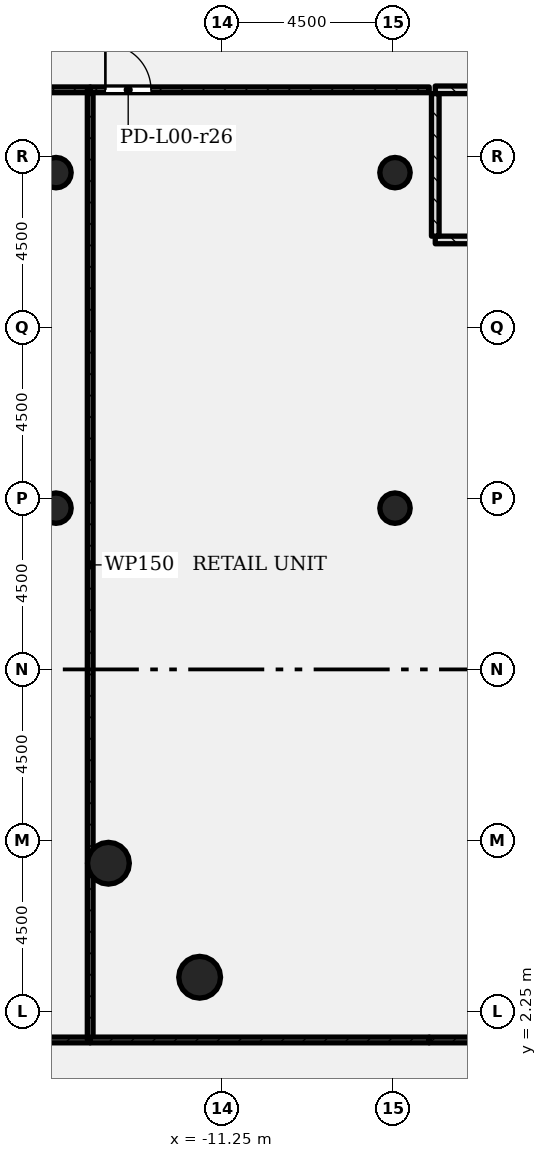
"""IFC4 building model, lengths in metres.
Left out: names, types, materials, properties, quantities, classifications, styles, units other than length and angle.
Written with IfcOpenShell. Run it as: python <this file> out.ifc"""

import sys

from ifc_helpers import new_model, si_unit, direction, frame, frame_2d, origin, origin_2d, place, context, subcontext, project, spatial, rectangle, hollow_circle, extrude, element, fill, save


model = new_model("IFC4")
c1 = context("Model", 3, precision=1e-05, world=origin(), true_north=direction((0.0, 1.0)))
c2 = subcontext(c1, "Body", "Model", "MODEL_VIEW")
j1 = project(units=[si_unit("LENGTHUNIT", "METRE"), si_unit("PLANEANGLEUNIT", "RADIAN")], contexts=[c1])
p1 = place(None, origin())
s1 = spatial("IfcSite", under=j1, at=p1, CompositionType="ELEMENT")
p2 = place(p1, origin())
s2 = spatial("IfcBuilding", under=s1, at=p2, CompositionType="ELEMENT")
p3 = place(p2, origin())
s3 = spatial("IfcBuildingStorey", under=s2, at=p3, CompositionType="ELEMENT", Elevation=0.0)
for number, where, z_axis, x_axis in (
    (1, (-14.25, 6.15, -0.4), (0.0, 0.0, 1.0), (1.0, 0.0, 0.0)),
    (2, (-11.85, 3.15, -0.4), (0.0, 0.0, 1.0), (1.0, 0.0, 0.0)),
):
    element("IfcColumn", number, at=place(p3, frame(where, z_axis=z_axis, x_axis=x_axis)), inside=s3, PredefinedType="COLUMN", context=c2, shape_type="SweptSolid", body=[
        extrude(hollow_circle(Radius=0.55, WallThickness=0.04, at=origin_2d()), origin(), (0.0, 0.0, 1.0), 6.4),
    ])
for number, where, z_axis, x_axis in (
    (3, (-15.63, 15.493, -0.4), (0.0, 0.0, 1.0), (1.0, 0.0, 0.0)),
    (4, (-6.71, 15.493, -0.4), (0.0, 0.0, 1.0), (1.0, 0.0, 0.0)),
    (5, (-15.63, 24.321, -0.4), (0.0, 0.0, 1.0), (1.0, 0.0, 0.0)),
    (6, (-6.71, 24.321, -0.4), (0.0, 0.0, 1.0), (1.0, 0.0, 0.0)),
):
    element("IfcColumn", number, at=place(p3, frame(where, z_axis=z_axis, x_axis=x_axis)), inside=s3, PredefinedType="COLUMN", context=c2, shape_type="SweptSolid", body=[
        extrude(hollow_circle(Radius=0.4, WallThickness=0.028, at=origin_2d()), origin(), (0.0, 0.0, 1.0), 6.4),
    ])
p4 = place(p3, frame((-23.65, 26.5, 0.0), z_axis=(0.0, 0.0, 1.0), x_axis=(1.0, 0.0, 0.0)))
e7 = element("IfcWall", 7, at=p4, inside=s3, PredefinedType="PARTITIONING", context=c2, shape_type="SweptSolid", body=[
    extrude(rectangle(XDim=8.92, YDim=0.15, at=frame_2d((4.46, 0.0))), origin(), (0.0, 0.0, 1.0), 5.58),
])
p5 = place(p4, frame((0.4, 0.0, 0.0)))
e8 = element("IfcOpeningElement", 8, at=p5, cuts=e7, PredefinedType="OPENING", context=c2, shape_type="SweptSolid", body=[
    extrude(rectangle(XDim=1.2, YDim=2.1, at=frame_2d((0.6, 1.05))), frame((0.0, 0.085, 0.0), z_axis=(0.0, -1.0, 0.0), x_axis=(1.0, 0.0, 0.0)), (0.0, 0.0, 1.0), 0.17),
])
p6 = place(p3, frame((-14.73, 1.5, 0.0), z_axis=(0.0, 0.0, 1.0), x_axis=(-1.0, 0.0, 0.0)))
e9 = element("IfcWall", 9, at=p6, inside=s3, PredefinedType="PARTITIONING", context=c2, shape_type="SweptSolid", body=[
    extrude(rectangle(XDim=5.52, YDim=0.15, at=frame_2d((2.76, 0.0))), origin(), (0.0, 0.0, 1.0), 5.58),
])
p7 = place(p3, frame((-14.73, 26.5, 0.0), z_axis=(0.0, 0.0, 1.0), x_axis=(0.0, -1.0, 0.0)))
e10 = element("IfcWall", 10, at=p7, inside=s3, PredefinedType="PARTITIONING", context=c2, shape_type="SweptSolid", body=[
    extrude(rectangle(XDim=25.0, YDim=0.15, at=frame_2d((12.5, 0.0))), origin(), (0.0, 0.0, 1.0), 5.58),
])
p8 = place(p3, frame((-14.73, 26.5, 0.0), z_axis=(0.0, 0.0, 1.0), x_axis=(1.0, 0.0, 0.0)))
e11 = element("IfcWall", 11, at=p8, inside=s3, PredefinedType="PARTITIONING", context=c2, shape_type="SweptSolid", body=[
    extrude(rectangle(XDim=8.92, YDim=0.15, at=frame_2d((4.46, 0.0))), origin(), (0.0, 0.0, 1.0), 5.58),
])
p9 = place(p8, frame((0.4, 0.0, 0.0)))
e12 = element("IfcOpeningElement", 12, at=p9, cuts=e11, PredefinedType="OPENING", context=c2, shape_type="SweptSolid", body=[
    extrude(rectangle(XDim=1.2, YDim=2.1, at=frame_2d((0.6, 1.05))), frame((0.0, 0.085, 0.0), z_axis=(0.0, -1.0, 0.0), x_axis=(1.0, 0.0, 0.0)), (0.0, 0.0, 1.0), 0.17),
])
p10 = place(p3, frame((-5.81, 1.5, 0.0), z_axis=(0.0, 0.0, 1.0), x_axis=(-1.0, 0.0, 0.0)))
e13 = element("IfcWall", 13, at=p10, inside=s3, PredefinedType="PARTITIONING", context=c2, shape_type="SweptSolid", body=[
    extrude(rectangle(XDim=8.92, YDim=0.15, at=frame_2d((4.46, 0.0))), origin(), (0.0, 0.0, 1.0), 5.58),
])
p11 = place(p3, frame((-5.65, 26.5, 0.0), z_axis=(0.0, 0.0, 1.0), x_axis=(1.0, 0.0, 0.0)))
e14 = element("IfcWall", 14, at=p11, inside=s3, PredefinedType="SHEAR", context=c2, shape_type="SweptSolid", body=[
    extrude(rectangle(XDim=6.8, YDim=0.2, at=frame_2d((3.4, 0.0))), origin(), (0.0, 0.0, 1.0), 5.58),
])
p12 = place(p11, frame((5.35, 0.0, 0.0)))
e15 = element("IfcOpeningElement", 15, at=p12, cuts=e14, PredefinedType="OPENING", context=c2, shape_type="SweptSolid", body=[
    extrude(rectangle(XDim=0.9, YDim=2.1, at=frame_2d((0.45, 1.05))), frame((0.0, 0.11, 0.0), z_axis=(0.0, -1.0, 0.0), x_axis=(1.0, 0.0, 0.0)), (0.0, 0.0, 1.0), 0.22),
])
p13 = place(p3, frame((-5.65, 22.55, 0.0), z_axis=(0.0, 0.0, 1.0), x_axis=(1.0, 0.0, 0.0)))
e16 = element("IfcWall", 16, at=p13, inside=s3, PredefinedType="SHEAR", context=c2, shape_type="SweptSolid", body=[
    extrude(rectangle(XDim=6.8, YDim=0.2, at=frame_2d((3.4, 0.0))), origin(), (0.0, 0.0, 1.0), 5.58),
])
p14 = place(p3, frame((-5.65, 22.65, 0.0), z_axis=(0.0, 0.0, 1.0), x_axis=(0.0, 1.0, 0.0)))
e17 = element("IfcWall", 17, at=p14, inside=s3, PredefinedType="SHEAR", context=c2, shape_type="SweptSolid", body=[
    extrude(rectangle(XDim=3.75, YDim=0.2, at=frame_2d((1.875, 0.0))), origin(), (0.0, 0.0, 1.0), 5.58),
])
p15 = place(p3, frame((3.11, 1.5, 0.0), z_axis=(0.0, 0.0, 1.0), x_axis=(-1.0, 0.0, 0.0)))
e18 = element("IfcWall", 18, at=p15, inside=s3, PredefinedType="PARTITIONING", context=c2, shape_type="SweptSolid", body=[
    extrude(rectangle(XDim=8.92, YDim=0.15, at=frame_2d((4.46, 0.0))), origin(), (0.0, 0.0, 1.0), 5.58),
])
p16 = place(p15, frame((0.4, 0.0, 0.0)))
e19 = element("IfcOpeningElement", 19, at=p16, cuts=e18, PredefinedType="OPENING", context=c2, shape_type="SweptSolid", body=[
    extrude(rectangle(XDim=1.2, YDim=2.1, at=frame_2d((0.6, 1.05))), frame((0.0, 0.085, 0.0), z_axis=(0.0, -1.0, 0.0), x_axis=(1.0, 0.0, 0.0)), (0.0, 0.0, 1.0), 0.17),
])
p17 = place(p9, origin())
e20 = element("IfcDoor", 20, at=p17, inside=s3, OperationType="SINGLE_SWING_RIGHT", PredefinedType="DOOR", context=c2, shape_type="SweptSolid", body=[
    extrude(rectangle(XDim=1.2, YDim=2.1, at=frame_2d((0.6, 1.05))), frame((0.0, 0.025, 0.0), z_axis=(0.0, -1.0, 0.0), x_axis=(1.0, 0.0, 0.0)), (0.0, 0.0, 1.0), 0.05),
])
fill(e12, e20)
save(model, sys.argv[1])
